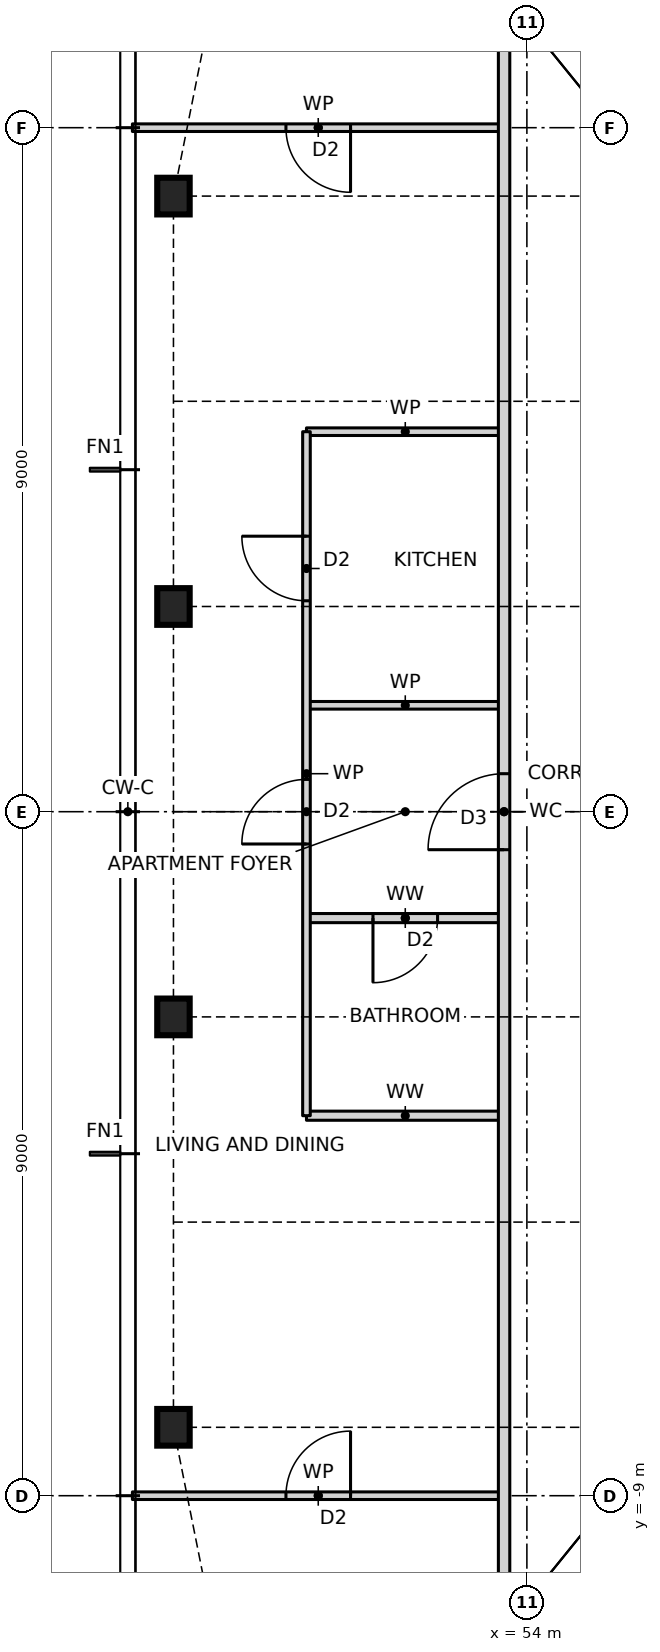
"""IFC4 building model, lengths in metres.
Left out: names, types, materials, properties, quantities, classifications, styles, units other than length and angle.
Written with IfcOpenShell. Run it as: python <this file> out.ifc"""

import sys

from ifc_helpers import new_model, si_unit, direction, frame, frame_2d, origin, origin_2d, place, context, subcontext, project, spatial, rectangle, i_section, extrude, element, fill, save


model = new_model("IFC4")
c1 = context("Model", 3, precision=1e-05, world=origin(), true_north=direction((0.0, 1.0)))
c2 = subcontext(c1, "Body", "Model", "MODEL_VIEW")
j1 = project(units=[si_unit("LENGTHUNIT", "METRE"), si_unit("PLANEANGLEUNIT", "RADIAN")], contexts=[c1])
p1 = place(None, origin())
s1 = spatial("IfcSite", under=j1, at=p1, CompositionType="ELEMENT")
p2 = place(p1, origin())
s2 = spatial("IfcBuilding", under=s1, at=p2, CompositionType="ELEMENT")
p3 = place(p2, frame((0.0, 0.0, 115.5)))
s3 = spatial("IfcBuildingStorey", under=s2, at=p3, CompositionType="ELEMENT", Elevation=115.5)
for number, where, z_axis, x_axis in (
    (1, (49.35, 8.1, 0.0), (0.0, 0.0, 1.0), (1.0, 0.0, 0.0)),
    (2, (49.35, 2.7, 0.0), (0.0, 0.0, 1.0), (1.0, 0.0, 0.0)),
    (3, (49.35, -2.7, 0.0), (0.0, 0.0, 1.0), (1.0, 0.0, 0.0)),
    (4, (49.35, -8.1, 0.0), (0.0, 0.0, 1.0), (1.0, 0.0, 0.0)),
):
    element("IfcColumn", number, at=place(p3, frame(where, z_axis=z_axis, x_axis=x_axis)), inside=s3, PredefinedType="COLUMN", context=c2, shape_type="SweptSolid", body=[
        extrude(i_section(OverallWidth=0.427, OverallDepth=0.483, WebThickness=0.051, FlangeThickness=0.082, at=origin_2d()), origin(), (0.0, 0.0, 1.0), 3.5),
    ])
p4 = place(p3, frame((48.81, -9.0, 0.0), z_axis=(0.0, 0.0, 1.0), x_axis=(1.0, 0.0, 0.0)))
e5 = element("IfcWall", 5, at=p4, inside=s3, PredefinedType="PARTITIONING", context=c2, shape_type="SweptSolid", body=[
    extrude(rectangle(XDim=4.89, YDim=0.1, at=frame_2d((2.445, 0.0))), origin(), (0.0, 0.0, 1.0), 3.27),
])
p5 = place(p4, frame((2.02, 0.0, 0.0)))
e6 = element("IfcOpeningElement", 6, at=p5, cuts=e5, PredefinedType="OPENING", context=c2, shape_type="SweptSolid", body=[
    extrude(rectangle(XDim=0.85, YDim=2.1, at=frame_2d((0.425, 1.05))), frame((0.0, 0.06, 0.0), z_axis=(0.0, -1.0, 0.0), x_axis=(1.0, 0.0, 0.0)), (0.0, 0.0, 1.0), 0.12),
])
p6 = place(p3, frame((51.1, -4.0, 0.0), z_axis=(0.0, 0.0, 1.0), x_axis=(1.0, 0.0, 0.0)))
e7 = element("IfcWall", 7, at=p6, inside=s3, PredefinedType="PARTITIONING", context=c2, shape_type="SweptSolid", body=[
    extrude(rectangle(XDim=2.6, YDim=0.12, at=frame_2d((1.3, 0.0))), origin(), (0.0, 0.0, 1.0), 3.27),
])
p7 = place(p3, frame((51.1, -1.4, 0.0), z_axis=(0.0, 0.0, 1.0), x_axis=(1.0, 0.0, 0.0)))
e8 = element("IfcWall", 8, at=p7, inside=s3, PredefinedType="PARTITIONING", context=c2, shape_type="SweptSolid", body=[
    extrude(rectangle(XDim=2.6, YDim=0.12, at=frame_2d((1.3, 0.0))), origin(), (0.0, 0.0, 1.0), 3.27),
])
p8 = place(p7, frame((0.875, 0.0, 0.0)))
e9 = element("IfcOpeningElement", 9, at=p8, cuts=e8, PredefinedType="OPENING", context=c2, shape_type="SweptSolid", body=[
    extrude(rectangle(XDim=0.85, YDim=2.1, at=frame_2d((0.425, 1.05))), frame((0.0, 0.07, 0.0), z_axis=(0.0, -1.0, 0.0), x_axis=(1.0, 0.0, 0.0)), (0.0, 0.0, 1.0), 0.14),
])
for number, where, z_axis, x_axis in (
    (10, (51.1, 1.4, 0.0), (0.0, 0.0, 1.0), (1.0, 0.0, 0.0)),
    (11, (51.1, 5.0, 0.0), (0.0, 0.0, 1.0), (1.0, 0.0, 0.0)),
):
    element("IfcWall", number, at=place(p3, frame(where, z_axis=z_axis, x_axis=x_axis)), inside=s3, PredefinedType="PARTITIONING", context=c2, shape_type="SweptSolid", body=[
        extrude(rectangle(XDim=2.6, YDim=0.1, at=frame_2d((1.3, 0.0))), origin(), (0.0, 0.0, 1.0), 3.27),
    ])
p9 = place(p3, frame((48.81, 9.0, 0.0), z_axis=(0.0, 0.0, 1.0), x_axis=(1.0, 0.0, 0.0)))
e12 = element("IfcWall", 12, at=p9, inside=s3, PredefinedType="PARTITIONING", context=c2, shape_type="SweptSolid", body=[
    extrude(rectangle(XDim=4.89, YDim=0.1, at=frame_2d((2.445, 0.0))), origin(), (0.0, 0.0, 1.0), 3.27),
])
p10 = place(p9, frame((2.02, 0.0, 0.0)))
e13 = element("IfcOpeningElement", 13, at=p10, cuts=e12, PredefinedType="OPENING", context=c2, shape_type="SweptSolid", body=[
    extrude(rectangle(XDim=0.85, YDim=2.1, at=frame_2d((0.425, 1.05))), frame((0.0, 0.06, 0.0), z_axis=(0.0, -1.0, 0.0), x_axis=(1.0, 0.0, 0.0)), (0.0, 0.0, 1.0), 0.12),
])
p11 = place(p3, frame((53.7, -10.768, 0.0), z_axis=(0.0, 0.0, 1.0), x_axis=(0.0, 1.0, 0.0)))
e14 = element("IfcWall", 14, at=p11, inside=s3, PredefinedType="PARTITIONING", context=c2, shape_type="SweptSolid", body=[
    extrude(rectangle(XDim=21.536, YDim=0.15, at=frame_2d((10.768, 0.0))), origin(), (0.0, 0.0, 1.0), 3.27),
])
p12 = place(p11, frame((10.268, 0.0, 0.0)))
e15 = element("IfcOpeningElement", 15, at=p12, cuts=e14, PredefinedType="OPENING", context=c2, shape_type="SweptSolid", body=[
    extrude(rectangle(XDim=1.0, YDim=2.1, at=frame_2d((0.5, 1.05))), frame((0.0, 0.085, 0.0), z_axis=(0.0, -1.0, 0.0), x_axis=(1.0, 0.0, 0.0)), (0.0, 0.0, 1.0), 0.17),
])
p13 = place(p3, frame((51.1, -4.0, 0.0), z_axis=(0.0, 0.0, 1.0), x_axis=(0.0, 1.0, 0.0)))
e16 = element("IfcWall", 16, at=p13, inside=s3, PredefinedType="PARTITIONING", context=c2, shape_type="SweptSolid", body=[
    extrude(rectangle(XDim=9.0, YDim=0.1, at=frame_2d((4.5, 0.0))), origin(), (0.0, 0.0, 1.0), 3.27),
])
p14 = place(p13, frame((6.775, 0.0, 0.0)))
e17 = element("IfcOpeningElement", 17, at=p14, cuts=e16, PredefinedType="OPENING", context=c2, shape_type="SweptSolid", body=[
    extrude(rectangle(XDim=0.85, YDim=2.1, at=frame_2d((0.425, 1.05))), frame((0.0, 0.06, 0.0), z_axis=(0.0, -1.0, 0.0), x_axis=(1.0, 0.0, 0.0)), (0.0, 0.0, 1.0), 0.12),
])
p15 = place(p13, frame((3.575, 0.0, 0.0)))
e18 = element("IfcOpeningElement", 18, at=p15, cuts=e16, PredefinedType="OPENING", context=c2, shape_type="SweptSolid", body=[
    extrude(rectangle(XDim=0.85, YDim=2.1, at=frame_2d((0.425, 1.05))), frame((0.0, 0.06, 0.0), z_axis=(0.0, -1.0, 0.0), x_axis=(1.0, 0.0, 0.0)), (0.0, 0.0, 1.0), 0.12),
])
p16 = place(p14, origin())
e19 = element("IfcDoor", 19, at=p16, inside=s3, OperationType="SINGLE_SWING_RIGHT", PredefinedType="DOOR", context=c2, shape_type="SweptSolid", body=[
    extrude(rectangle(XDim=0.85, YDim=2.1, at=frame_2d((0.425, 1.05))), frame((0.0, 0.025, 0.0), z_axis=(0.0, -1.0, 0.0), x_axis=(1.0, 0.0, 0.0)), (0.0, 0.0, 1.0), 0.05),
])
fill(e17, e19)
p17 = place(p12, origin())
e20 = element("IfcDoor", 20, at=p17, inside=s3, OperationType="SINGLE_SWING_LEFT", PredefinedType="DOOR", context=c2, shape_type="SweptSolid", body=[
    extrude(rectangle(XDim=1.0, YDim=2.1, at=frame_2d((0.5, 1.05))), frame((0.0, 0.025, 0.0), z_axis=(0.0, -1.0, 0.0), x_axis=(1.0, 0.0, 0.0)), (0.0, 0.0, 1.0), 0.05),
])
fill(e15, e20)
p18 = place(p15, origin())
e21 = element("IfcDoor", 21, at=p18, inside=s3, OperationType="SINGLE_SWING_LEFT", PredefinedType="DOOR", context=c2, shape_type="SweptSolid", body=[
    extrude(rectangle(XDim=0.85, YDim=2.1, at=frame_2d((0.425, 1.05))), frame((0.0, 0.025, 0.0), z_axis=(0.0, -1.0, 0.0), x_axis=(1.0, 0.0, 0.0)), (0.0, 0.0, 1.0), 0.05),
])
fill(e18, e21)
p19 = place(p8, frame((0.85, 0.0, 0.0), z_axis=(0.0, 0.0, 1.0), x_axis=(-1.0, 0.0, 0.0)))
e22 = element("IfcDoor", 22, at=p19, inside=s3, OperationType="SINGLE_SWING_RIGHT", PredefinedType="DOOR", context=c2, shape_type="SweptSolid", body=[
    extrude(rectangle(XDim=0.85, YDim=2.1, at=frame_2d((0.425, 1.05))), frame((0.0, 0.025, 0.0), z_axis=(0.0, -1.0, 0.0), x_axis=(1.0, 0.0, 0.0)), (0.0, 0.0, 1.0), 0.05),
])
fill(e9, e22)
p20 = place(p10, frame((0.85, 0.0, 0.0), z_axis=(0.0, 0.0, 1.0), x_axis=(-1.0, 0.0, 0.0)))
e23 = element("IfcDoor", 23, at=p20, inside=s3, OperationType="SINGLE_SWING_LEFT", PredefinedType="DOOR", context=c2, shape_type="SweptSolid", body=[
    extrude(rectangle(XDim=0.85, YDim=2.1, at=frame_2d((0.425, 1.05))), frame((0.0, 0.025, 0.0), z_axis=(0.0, -1.0, 0.0), x_axis=(1.0, 0.0, 0.0)), (0.0, 0.0, 1.0), 0.05),
])
fill(e13, e23)
p21 = place(p5, origin())
e24 = element("IfcDoor", 24, at=p21, inside=s3, OperationType="SINGLE_SWING_RIGHT", PredefinedType="DOOR", context=c2, shape_type="SweptSolid", body=[
    extrude(rectangle(XDim=0.85, YDim=2.1, at=frame_2d((0.425, 1.05))), frame((0.0, 0.025, 0.0), z_axis=(0.0, -1.0, 0.0), x_axis=(1.0, 0.0, 0.0)), (0.0, 0.0, 1.0), 0.05),
])
fill(e6, e24)
save(model, sys.argv[1])
